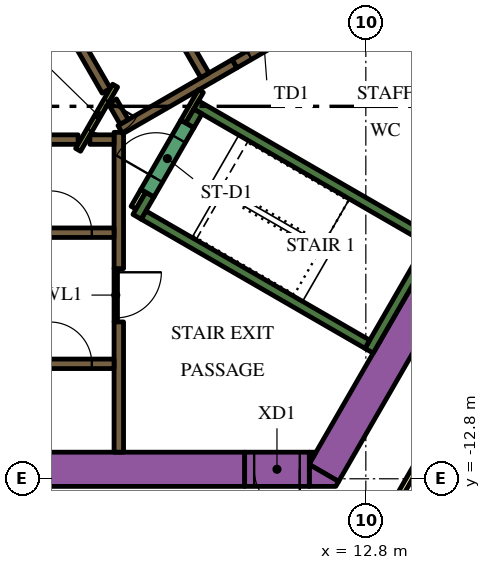
"""IFC4 building model, lengths in metres.
Left out: names, types, materials, properties, quantities, classifications, styles, units other than length and angle.
Written with IfcOpenShell. Run it as: python <this file> out.ifc"""

import sys

from ifc_helpers import new_model, si_unit, direction, frame, frame_2d, origin, place, context, subcontext, project, spatial, polyline, rectangle, outline, extrude, element, fill, save


model = new_model("IFC4")
c1 = context("Model", 3, precision=1e-05, world=origin(), true_north=direction((0.0, 1.0)))
c2 = subcontext(c1, "Body", "Model", "MODEL_VIEW")
j1 = project(units=[si_unit("LENGTHUNIT", "METRE"), si_unit("PLANEANGLEUNIT", "RADIAN")], contexts=[c1])
p1 = place(None, origin())
s1 = spatial("IfcSite", under=j1, at=p1, CompositionType="ELEMENT")
p2 = place(p1, origin())
s2 = spatial("IfcBuilding", under=s1, at=p2, CompositionType="ELEMENT")
p3 = place(p2, frame((0.0, 0.0, 74.4)))
s3 = spatial("IfcBuildingStorey", under=s2, at=p3, CompositionType="ELEMENT", Elevation=74.4)
p4 = place(p3, frame((6.461, 13.909, 0.0), z_axis=(0.0, 0.0, 1.0), x_axis=(0.500005804227, -0.866022052686, 0.0)))
e1 = element("IfcWall", 1, at=p4, inside=s3, PredefinedType="SOLIDWALL", context=c2, shape_type="SweptSolid", body=[
    extrude(rectangle(XDim=20.834, YDim=0.9, at=frame_2d((10.417, 0.0))), origin(), (0.0, 0.0, 1.0), 3.9),
])
p5 = place(p3, frame((11.695, -12.644, 0.0), z_axis=(0.0, 0.0, 1.0), x_axis=(0.500010229568, 0.86601949766, 0.0)))
e2 = element("IfcWall", 2, at=p5, inside=s3, PredefinedType="SOLIDWALL", context=c2, shape_type="SweptSolid", body=[
    extrude(rectangle(XDim=9.326, YDim=0.9, at=frame_2d((4.663, 0.0))), origin(), (0.0, 0.0, 1.0), 3.9),
])
p6 = place(p3, origin())
e3 = element("IfcWall", 3, at=p6, inside=s3, PredefinedType="SOLIDWALL", context=c2, shape_type="SweptSolid", body=[
    extrude(outline(polyline([(12.009, -13.0), (11.312, -13.0), (11.312, -12.425), (12.083, -12.871), (12.009, -13.0)])), origin(), (0.0, 0.0, 1.0), 3.9),
])
e4 = element("IfcWall", 4, at=p6, inside=s3, PredefinedType="SOLIDWALL", context=c2, shape_type="SweptSolid", body=[
    extrude(outline(polyline([(11.489, -12.1), (11.312, -12.407), (11.312, -12.1), (11.489, -12.1)])), origin(), (0.0, 0.0, 1.0), 3.9),
])
p7 = place(p3, frame((-12.019, -12.55, 0.0), z_axis=(0.0, 0.0, 1.0), x_axis=(1.0, 0.0, 0.0)))
e5 = element("IfcWall", 5, at=p7, inside=s3, PredefinedType="SOLIDWALL", context=c2, shape_type="SweptSolid", body=[
    extrude(rectangle(XDim=21.63, YDim=0.9, at=frame_2d((10.815, 0.0))), origin(), (0.0, 0.0, 1.0), 3.9),
])
p8 = place(p3, frame((12.885, -9.431, 0.0), z_axis=(0.0, 0.0, 1.0), x_axis=(0.500020560727, 0.866013532718, 0.0)))
e6 = element("IfcWall", 6, at=p8, inside=s3, PredefinedType="SOLIDWALL", context=c2, shape_type="SweptSolid", body=[
    extrude(rectangle(XDim=3.45, YDim=0.25, at=frame_2d((1.725, 0.0))), origin(), (0.0, 0.0, 1.0), 3.9),
])
p9 = place(p3, frame((12.84, -9.261, 0.0), z_axis=(0.0, 0.0, 1.0), x_axis=(-0.866013990052, 0.500019768644, 0.0)))
e7 = element("IfcWall", 7, at=p9, inside=s3, PredefinedType="SOLIDWALL", context=c2, shape_type="SweptSolid", body=[
    extrude(rectangle(XDim=6.8, YDim=0.25, at=frame_2d((3.4, 0.0))), origin(), (0.0, 0.0, 1.0), 3.9),
])
p10 = place(p3, frame((6.78, -5.906, 0.0), z_axis=(0.0, 0.0, 1.0), x_axis=(0.500223362819, 0.865896406789, 0.0)))
e8 = element("IfcWall", 8, at=p10, inside=s3, PredefinedType="SOLIDWALL", context=c2, shape_type="SweptSolid", body=[
    extrude(rectangle(XDim=0.675, YDim=0.25, at=frame_2d((0.337, 0.0))), origin(), (0.0, 0.0, 1.0), 3.9),
])
p11 = place(p3, frame((8.334, -2.964, 0.0), z_axis=(0.0, 0.0, 1.0), x_axis=(0.866016039709, -0.500016218704, 0.0)))
e9 = element("IfcWall", 9, at=p11, inside=s3, PredefinedType="SOLIDWALL", context=c2, shape_type="SweptSolid", body=[
    extrude(rectangle(XDim=7.05, YDim=0.25, at=frame_2d((3.525, 0.0))), origin(), (0.0, 0.0, 1.0), 3.9),
])
p12 = place(p3, frame((8.168, -3.503, 0.0), z_axis=(0.0, 0.0, 1.0), x_axis=(0.49972245349, 0.866185586049, 0.0)))
e10 = element("IfcWall", 10, at=p12, inside=s3, PredefinedType="SOLIDWALL", context=c2, shape_type="SweptSolid", body=[
    extrude(rectangle(XDim=0.425, YDim=0.25, at=frame_2d((0.212, 0.0))), origin(), (0.0, 0.0, 1.0), 3.9),
])
p13 = place(p3, frame((-5.259, -3.875, 0.0), z_axis=(0.0, 0.0, 1.0), x_axis=(1.0, 0.0, 0.0)))
e11 = element("IfcWall", 11, at=p13, inside=s3, PredefinedType="SOLIDWALL", context=c2, shape_type="SweptSolid", body=[
    extrude(rectangle(XDim=10.489, YDim=0.25, at=frame_2d((5.244, 0.0))), origin(), (0.0, 0.0, 1.0), 3.9),
])
p14 = place(p3, frame((6.3, -7.27, 0.0), z_axis=(0.0, 0.0, 1.0), x_axis=(0.0, 1.0, 0.0)))
e12 = element("IfcWall", 12, at=p14, inside=s3, PredefinedType="SOLIDWALL", context=c2, shape_type="SweptSolid", body=[
    extrude(rectangle(XDim=3.586, YDim=0.25, at=frame_2d((1.793, 0.0))), origin(), (0.0, 0.0, 1.0), 3.9),
])
p15 = place(p3, frame((6.3, -12.1, 0.0), z_axis=(0.0, 0.0, 1.0), x_axis=(0.0, 1.0, 0.0)))
e13 = element("IfcWall", 13, at=p15, inside=s3, PredefinedType="SOLIDWALL", context=c2, shape_type="SweptSolid", body=[
    extrude(rectangle(XDim=3.428, YDim=0.25, at=frame_2d((1.714, 0.0))), origin(), (0.0, 0.0, 1.0), 3.9),
])
p16 = place(p3, frame((5.538, -3.875, 0.0), z_axis=(0.0, 0.0, 1.0), x_axis=(1.0, 0.0, 0.0)))
e14 = element("IfcWall", 14, at=p16, inside=s3, PredefinedType="SOLIDWALL", context=c2, shape_type="SweptSolid", body=[
    extrude(rectangle(XDim=0.637, YDim=0.25, at=frame_2d((0.318, 0.0))), origin(), (0.0, 0.0, 1.0), 3.9),
])
p17 = place(p3, frame((9.346, -1.879, 0.0), z_axis=(0.0, 0.0, 1.0), x_axis=(-0.866048528039, -0.499959945477, 0.0)))
e15 = element("IfcWall", 15, at=p17, inside=s3, PredefinedType="SOLIDWALL", context=c2, shape_type="SweptSolid", body=[
    extrude(rectangle(XDim=3.47, YDim=0.25, at=frame_2d((1.735, 0.0))), origin(), (0.0, 0.0, 1.0), 3.9),
])
p18 = place(p3, frame((6.13, -2.867, 0.0), z_axis=(0.0, 0.0, 1.0), x_axis=(0.500160776593, -0.865932559475, 0.0)))
e16 = element("IfcWall", 16, at=p18, inside=s3, PredefinedType="SOLIDWALL", context=c2, shape_type="SweptSolid", body=[
    extrude(rectangle(XDim=0.627, YDim=0.25, at=frame_2d((0.313, 0.0))), origin(), (0.0, 0.0, 1.0), 3.9),
])
p19 = place(p3, frame((5.97, -2.591, 0.0), z_axis=(0.0, 0.0, 1.0), x_axis=(-0.499994469932, 0.866028596547, 0.0)))
e17 = element("IfcWall", 17, at=p19, inside=s3, PredefinedType="SOLIDWALL", context=c2, shape_type="SweptSolid", body=[
    extrude(rectangle(XDim=10.488, YDim=0.25, at=frame_2d((5.244, 0.0))), origin(), (0.0, 0.0, 1.0), 3.9),
])
p20 = place(p3, frame((6.945, -5.222, 0.0), z_axis=(0.0, 0.0, 1.0), x_axis=(-0.499818422106, -0.866130212453, 0.0)))
e18 = element("IfcWall", 18, at=p20, inside=s3, PredefinedType="PARTITIONING", context=c2, shape_type="SweptSolid", body=[
    extrude(rectangle(XDim=0.514, YDim=0.15, at=frame_2d((0.257, 0.0))), origin(), (0.0, 0.0, 1.0), 2.7),
])
p21 = place(p3, frame((8.459, -2.599, 0.0), z_axis=(0.0, 0.0, 1.0), x_axis=(-0.500041054325, -0.866001699761, 0.0)))
e19 = element("IfcWall", 19, at=p21, inside=s3, PredefinedType="PARTITIONING", context=c2, shape_type="SweptSolid", body=[
    extrude(rectangle(XDim=0.929, YDim=0.15, at=frame_2d((0.464, 0.0))), origin(), (0.0, 0.0, 1.0), 3.9),
])
p22 = place(p3, frame((-6.175, -9.775, 0.0), z_axis=(0.0, 0.0, 1.0), x_axis=(1.0, 0.0, 0.0)))
e20 = element("IfcWall", 20, at=p22, inside=s3, PredefinedType="SOLIDWALL", context=c2, shape_type="SweptSolid", body=[
    extrude(rectangle(XDim=12.35, YDim=0.25, at=frame_2d((6.175, 0.0))), origin(), (0.0, 0.0, 1.0), 3.9),
])
p23 = place(p22, frame((0.585, 0.0, 0.0)))
e21 = element("IfcOpeningElement", 21, at=p23, cuts=e20, PredefinedType="OPENING", context=c2, shape_type="SweptSolid", body=[
    extrude(rectangle(XDim=1.1, YDim=2.1, at=frame_2d((0.55, 1.05))), frame((0.0, 0.135, 0.0), z_axis=(0.0, -1.0, 0.0), x_axis=(1.0, 0.0, 0.0)), (0.0, 0.0, 1.0), 0.27),
])
p24 = place(p22, frame((3.105, 0.0, 0.0)))
e22 = element("IfcOpeningElement", 22, at=p24, cuts=e20, PredefinedType="OPENING", context=c2, shape_type="SweptSolid", body=[
    extrude(rectangle(XDim=1.1, YDim=2.1, at=frame_2d((0.55, 1.05))), frame((0.0, 0.135, 0.0), z_axis=(0.0, -1.0, 0.0), x_axis=(1.0, 0.0, 0.0)), (0.0, 0.0, 1.0), 0.27),
])
p25 = place(p22, frame((5.625, 0.0, 0.0)))
e23 = element("IfcOpeningElement", 23, at=p25, cuts=e20, PredefinedType="OPENING", context=c2, shape_type="SweptSolid", body=[
    extrude(rectangle(XDim=1.1, YDim=2.1, at=frame_2d((0.55, 1.05))), frame((0.0, 0.135, 0.0), z_axis=(0.0, -1.0, 0.0), x_axis=(1.0, 0.0, 0.0)), (0.0, 0.0, 1.0), 0.27),
])
p26 = place(p22, frame((8.145, 0.0, 0.0)))
e24 = element("IfcOpeningElement", 24, at=p26, cuts=e20, PredefinedType="OPENING", context=c2, shape_type="SweptSolid", body=[
    extrude(rectangle(XDim=1.1, YDim=2.1, at=frame_2d((0.55, 1.05))), frame((0.0, 0.135, 0.0), z_axis=(0.0, -1.0, 0.0), x_axis=(1.0, 0.0, 0.0)), (0.0, 0.0, 1.0), 0.27),
])
p27 = place(p22, frame((10.665, 0.0, 0.0)))
e25 = element("IfcOpeningElement", 25, at=p27, cuts=e20, PredefinedType="OPENING", context=c2, shape_type="SweptSolid", body=[
    extrude(rectangle(XDim=1.1, YDim=2.1, at=frame_2d((0.55, 1.05))), frame((0.0, 0.135, 0.0), z_axis=(0.0, -1.0, 0.0), x_axis=(1.0, 0.0, 0.0)), (0.0, 0.0, 1.0), 0.27),
])
p28 = place(p3, frame((-6.175, -6.325, 0.0), z_axis=(0.0, 0.0, 1.0), x_axis=(1.0, 0.0, 0.0)))
e26 = element("IfcWall", 26, at=p28, inside=s3, PredefinedType="SOLIDWALL", context=c2, shape_type="SweptSolid", body=[
    extrude(rectangle(XDim=12.35, YDim=0.25, at=frame_2d((6.175, 0.0))), origin(), (0.0, 0.0, 1.0), 3.9),
])
p29 = place(p28, frame((3.205, 0.0, 0.0)))
e27 = element("IfcOpeningElement", 27, at=p29, cuts=e26, PredefinedType="OPENING", context=c2, shape_type="SweptSolid", body=[
    extrude(rectangle(XDim=0.9, YDim=2.1, at=frame_2d((0.45, 1.05))), frame((0.0, 0.135, 0.0), z_axis=(0.0, -1.0, 0.0), x_axis=(1.0, 0.0, 0.0)), (0.0, 0.0, 1.0), 0.27),
])
p30 = place(p28, frame((8.145, 0.0, 0.0)))
e28 = element("IfcOpeningElement", 28, at=p30, cuts=e26, PredefinedType="OPENING", context=c2, shape_type="SweptSolid", body=[
    extrude(rectangle(XDim=1.1, YDim=2.1, at=frame_2d((0.55, 1.05))), frame((0.0, 0.135, 0.0), z_axis=(0.0, -1.0, 0.0), x_axis=(1.0, 0.0, 0.0)), (0.0, 0.0, 1.0), 0.27),
])
p31 = place(p28, frame((10.665, 0.0, 0.0)))
e29 = element("IfcOpeningElement", 29, at=p31, cuts=e26, PredefinedType="OPENING", context=c2, shape_type="SweptSolid", body=[
    extrude(rectangle(XDim=1.1, YDim=2.1, at=frame_2d((0.55, 1.05))), frame((0.0, 0.135, 0.0), z_axis=(0.0, -1.0, 0.0), x_axis=(1.0, 0.0, 0.0)), (0.0, 0.0, 1.0), 0.27),
])
p32 = place(p3, frame((8.565, -2.185, 0.0), z_axis=(0.0, 0.0, 1.0), x_axis=(-0.499997954832, 0.866026584559, 0.0)))
e30 = element("IfcWall", 30, at=p32, inside=s3, PredefinedType="SOLIDWALL", context=c2, shape_type="SweptSolid", body=[
    extrude(rectangle(XDim=12.35, YDim=0.25, at=frame_2d((6.175, 0.0))), origin(), (0.0, 0.0, 1.0), 3.9),
])
p33 = place(p32, frame((5.725, 0.0, 0.0)))
e31 = element("IfcOpeningElement", 31, at=p33, cuts=e30, PredefinedType="OPENING", context=c2, shape_type="SweptSolid", body=[
    extrude(rectangle(XDim=0.9, YDim=2.1, at=frame_2d((0.45, 1.05))), frame((0.0, 0.135, 0.0), z_axis=(0.0, -1.0, 0.0), x_axis=(1.0, 0.0, 0.0)), (0.0, 0.0, 1.0), 0.27),
])
p34 = place(p3, frame((7.053, -5.284, 0.0), z_axis=(0.0, 0.0, 1.0), x_axis=(0.500078061341, 0.865980330357, 0.0)))
e32 = element("IfcWall", 32, at=p34, inside=s3, PredefinedType="SOLIDWALL", context=c2, shape_type="SweptSolid", body=[
    extrude(rectangle(XDim=2.1, YDim=0.4, at=frame_2d((1.05, 0.0))), origin(), (0.0, 0.0, 1.0), 3.9),
])
p35 = place(p34, frame((0.45, 0.0, 0.0)))
e33 = element("IfcOpeningElement", 33, at=p35, cuts=e32, PredefinedType="OPENING", context=c2, shape_type="SweptSolid", body=[
    extrude(rectangle(XDim=1.2, YDim=2.1, at=frame_2d((0.6, 1.05))), frame((0.0, 0.21, 0.0), z_axis=(0.0, -1.0, 0.0), x_axis=(1.0, 0.0, 0.0)), (0.0, 0.0, 1.0), 0.42),
])
p36 = place(p3, frame((9.346, -1.879, 0.0), z_axis=(0.0, 0.0, 1.0), x_axis=(0.866047807691, 0.499961193289, 0.0)))
e34 = element("IfcWall", 34, at=p36, inside=s3, PredefinedType="SOLIDWALL", context=c2, shape_type="SweptSolid", body=[
    extrude(rectangle(XDim=1.8, YDim=0.25, at=frame_2d((0.9, 0.0))), origin(), (0.0, 0.0, 1.0), 3.9),
])
p37 = place(p36, frame((0.45, 0.0, 0.0)))
e35 = element("IfcOpeningElement", 35, at=p37, cuts=e34, PredefinedType="OPENING", context=c2, shape_type="SweptSolid", body=[
    extrude(rectangle(XDim=0.9, YDim=2.1, at=frame_2d((0.45, 1.05))), frame((0.0, 0.135, 0.0), z_axis=(0.0, -1.0, 0.0), x_axis=(1.0, 0.0, 0.0)), (0.0, 0.0, 1.0), 0.27),
])
p38 = place(p3, frame((6.203, -2.456, 0.0), z_axis=(0.0, 0.0, 1.0), x_axis=(-0.500043961785, -0.866000020948, 0.0)))
e36 = element("IfcWall", 36, at=p38, inside=s3, PredefinedType="PARTITIONING", context=c2, shape_type="SweptSolid", body=[
    extrude(rectangle(XDim=1.95, YDim=0.15, at=frame_2d((0.975, 0.0))), origin(), (0.0, 0.0, 1.0), 3.9),
])
p39 = place(p38, frame((0.45, 0.0, 0.0)))
e37 = element("IfcOpeningElement", 37, at=p39, cuts=e36, PredefinedType="OPENING", context=c2, shape_type="SweptSolid", body=[
    extrude(rectangle(XDim=0.9, YDim=2.1, at=frame_2d((0.45, 1.05))), frame((0.0, 0.085, 0.0), z_axis=(0.0, -1.0, 0.0), x_axis=(1.0, 0.0, 0.0)), (0.0, 0.0, 1.0), 0.17),
])
p40 = place(p3, frame((6.22, -7.266, 0.0), z_axis=(0.0, 0.0, 1.0), x_axis=(0.0, -1.0, 0.0)))
e38 = element("IfcWall", 38, at=p40, inside=s3, PredefinedType="PARTITIONING", context=c2, shape_type="SweptSolid", body=[
    extrude(rectangle(XDim=1.4, YDim=0.09, at=frame_2d((0.7, 0.0))), origin(), (0.0, 0.0, 1.0), 2.7),
])
p41 = place(p40, frame((0.1, 0.0, 0.0)))
e39 = element("IfcOpeningElement", 39, at=p41, cuts=e38, PredefinedType="OPENING", context=c2, shape_type="SweptSolid", body=[
    extrude(rectangle(XDim=1.2, YDim=2.1, at=frame_2d((0.6, 1.05))), frame((0.0, 0.055, 0.0), z_axis=(0.0, -1.0, 0.0), x_axis=(1.0, 0.0, 0.0)), (0.0, 0.0, 1.0), 0.11),
])
p42 = place(p3, frame((11.312, -12.55, 0.0), z_axis=(0.0, 0.0, 1.0), x_axis=(-1.0, 0.0, 0.0)))
e40 = element("IfcWall", 40, at=p42, inside=s3, PredefinedType="SOLIDWALL", context=c2, shape_type="SweptSolid", body=[
    extrude(rectangle(XDim=1.7, YDim=0.9, at=frame_2d((0.85, 0.0))), origin(), (0.0, 0.0, 1.0), 3.9),
])
p43 = place(p42, frame((0.25, 0.0, 0.0)))
e41 = element("IfcOpeningElement", 41, at=p43, cuts=e40, PredefinedType="OPENING", context=c2, shape_type="SweptSolid", body=[
    extrude(rectangle(XDim=1.2, YDim=2.1, at=frame_2d((0.6, 1.05))), frame((0.0, 0.46, 0.0), z_axis=(0.0, -1.0, 0.0), x_axis=(1.0, 0.0, 0.0)), (0.0, 0.0, 1.0), 0.92),
])
p44 = place(p3, frame((6.163, 18.475, 0.0), z_axis=(0.0, 0.0, 1.0), x_axis=(0.500001317485, -0.866024643133, 0.0)))
e42 = element("IfcWall", 42, at=p44, inside=s3, PredefinedType="PARTITIONING", context=c2, shape_type="SweptSolid", body=[
    extrude(rectangle(XDim=25.767, YDim=0.15, at=frame_2d((12.883, 0.0))), origin(), (0.0, 0.0, 1.0), 2.7),
])
p45 = place(p44, frame((21.953, 0.0, 0.0)))
e43 = element("IfcOpeningElement", 43, at=p45, cuts=e42, PredefinedType="OPENING", context=c2, shape_type="SweptSolid", body=[
    extrude(rectangle(XDim=1.0, YDim=2.1, at=frame_2d((0.5, 1.05))), frame((0.0, 0.085, 0.0), z_axis=(0.0, -1.0, 0.0), x_axis=(1.0, 0.0, 0.0)), (0.0, 0.0, 1.0), 0.17),
])
p46 = place(p44, frame((9.948, 0.0, 0.0)))
e44 = element("IfcOpeningElement", 44, at=p46, cuts=e42, PredefinedType="OPENING", context=c2, shape_type="SweptSolid", body=[
    extrude(rectangle(XDim=1.0, YDim=2.1, at=frame_2d((0.5, 1.05))), frame((0.0, 0.085, 0.0), z_axis=(0.0, -1.0, 0.0), x_axis=(1.0, 0.0, 0.0)), (0.0, 0.0, 1.0), 0.17),
])
p47 = place(p44, frame((8.641, 0.0, 0.0)))
e45 = element("IfcOpeningElement", 45, at=p47, cuts=e42, PredefinedType="OPENING", context=c2, shape_type="SweptSolid", body=[
    extrude(rectangle(XDim=1.0, YDim=2.1, at=frame_2d((0.5, 1.05))), frame((0.0, 0.085, 0.0), z_axis=(0.0, -1.0, 0.0), x_axis=(1.0, 0.0, 0.0)), (0.0, 0.0, 1.0), 0.17),
])
p48 = place(p3, frame((15.587, -9.952, 0.0), z_axis=(0.0, 0.0, 1.0), x_axis=(-0.500016618951, -0.866015808616, 0.0)))
e46 = element("IfcWall", 46, at=p48, inside=s3, PredefinedType="PARTITIONING", context=c2, shape_type="SweptSolid", body=[
    extrude(rectangle(XDim=5.268, YDim=0.15, at=frame_2d((2.634, 0.0))), origin(), (0.0, 0.0, 1.0), 2.7),
])
p49 = place(p27, origin())
e47 = element("IfcDoor", 47, at=p49, inside=s3, OperationType="DOUBLE_DOOR_SLIDING", PredefinedType="DOOR", context=c2, shape_type="SweptSolid", body=[
    extrude(rectangle(XDim=1.1, YDim=2.1, at=frame_2d((0.55, 1.05))), frame((0.0, 0.025, 0.0), z_axis=(0.0, -1.0, 0.0), x_axis=(1.0, 0.0, 0.0)), (0.0, 0.0, 1.0), 0.05),
])
fill(e25, e47)
p50 = place(p31, origin())
e48 = element("IfcDoor", 48, at=p50, inside=s3, OperationType="DOUBLE_DOOR_SLIDING", PredefinedType="DOOR", context=c2, shape_type="SweptSolid", body=[
    extrude(rectangle(XDim=1.1, YDim=2.1, at=frame_2d((0.55, 1.05))), frame((0.0, 0.025, 0.0), z_axis=(0.0, -1.0, 0.0), x_axis=(1.0, 0.0, 0.0)), (0.0, 0.0, 1.0), 0.05),
])
fill(e29, e48)
p51 = place(p35, origin())
e49 = element("IfcDoor", 49, at=p51, inside=s3, OperationType="SINGLE_SWING_LEFT", PredefinedType="DOOR", context=c2, shape_type="SweptSolid", body=[
    extrude(rectangle(XDim=1.2, YDim=2.1, at=frame_2d((0.6, 1.05))), frame((0.0, 0.025, 0.0), z_axis=(0.0, -1.0, 0.0), x_axis=(1.0, 0.0, 0.0)), (0.0, 0.0, 1.0), 0.05),
])
fill(e33, e49)
p52 = place(p37, origin())
e50 = element("IfcDoor", 50, at=p52, inside=s3, OperationType="SINGLE_SWING_LEFT", PredefinedType="DOOR", context=c2, shape_type="SweptSolid", body=[
    extrude(rectangle(XDim=0.9, YDim=2.1, at=frame_2d((0.45, 1.05))), frame((0.0, 0.025, 0.0), z_axis=(0.0, -1.0, 0.0), x_axis=(1.0, 0.0, 0.0)), (0.0, 0.0, 1.0), 0.05),
])
fill(e35, e50)
p53 = place(p39, origin())
e51 = element("IfcDoor", 51, at=p53, inside=s3, OperationType="SINGLE_SWING_LEFT", PredefinedType="DOOR", context=c2, shape_type="SweptSolid", body=[
    extrude(rectangle(XDim=0.9, YDim=2.1, at=frame_2d((0.45, 1.05))), frame((0.0, 0.025, 0.0), z_axis=(0.0, -1.0, 0.0), x_axis=(1.0, 0.0, 0.0)), (0.0, 0.0, 1.0), 0.05),
])
fill(e37, e51)
p54 = place(p41, origin())
e52 = element("IfcDoor", 52, at=p54, inside=s3, OperationType="SINGLE_SWING_LEFT", PredefinedType="DOOR", context=c2, shape_type="SweptSolid", body=[
    extrude(rectangle(XDim=1.2, YDim=2.1, at=frame_2d((0.6, 1.05))), frame((0.0, 0.025, 0.0), z_axis=(0.0, -1.0, 0.0), x_axis=(1.0, 0.0, 0.0)), (0.0, 0.0, 1.0), 0.05),
])
fill(e39, e52)
p55 = place(p43, origin())
e53 = element("IfcDoor", 53, at=p55, inside=s3, OperationType="SINGLE_SWING_LEFT", PredefinedType="DOOR", context=c2, shape_type="SweptSolid", body=[
    extrude(rectangle(XDim=1.2, YDim=2.1, at=frame_2d((0.6, 1.05))), frame((0.0, 0.025, 0.0), z_axis=(0.0, -1.0, 0.0), x_axis=(1.0, 0.0, 0.0)), (0.0, 0.0, 1.0), 0.05),
])
fill(e41, e53)
save(model, sys.argv[1])
